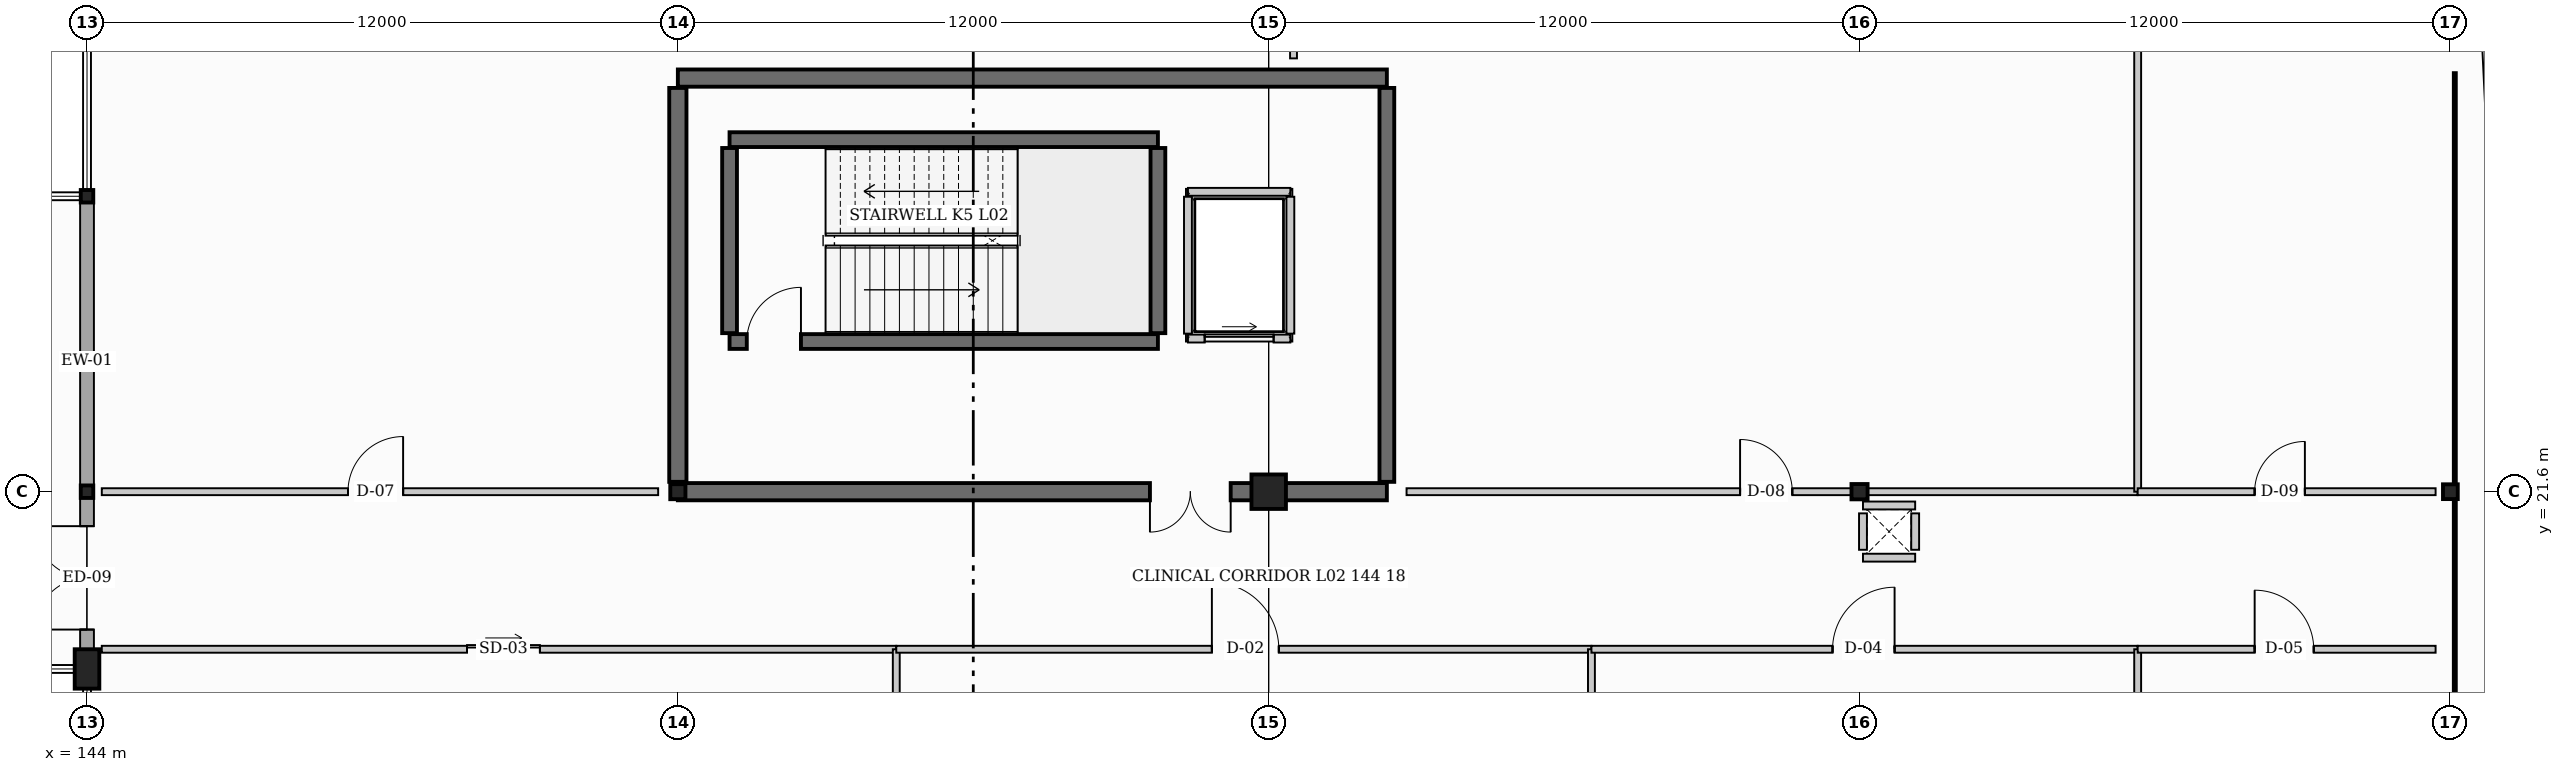
"""IFC4 building model, lengths in metres.
Left out: names, types, materials, properties, quantities, classifications, styles, units other than length and angle.
Written with IfcOpenShell. Run it as: python <this file> out.ifc"""

import sys

from ifc_helpers import new_model, si_unit, direction, frame, frame_2d, origin, origin_2d, place, context, subcontext, project, spatial, rectangle, hollow_rectangle, i_section, extrude, element, fill, save


model = new_model("IFC4")
c1 = context("Model", 3, precision=1e-05, world=origin(), true_north=direction((0.0, 1.0)))
c2 = subcontext(c1, "Body", "Model", "MODEL_VIEW")
j1 = project(units=[si_unit("LENGTHUNIT", "METRE"), si_unit("PLANEANGLEUNIT", "RADIAN")], contexts=[c1])
p1 = place(None, origin())
s1 = spatial("IfcSite", under=j1, at=p1, CompositionType="ELEMENT")
p2 = place(p1, origin())
s2 = spatial("IfcBuilding", under=s1, at=p2, CompositionType="ELEMENT")
p3 = place(p2, frame((0.0, 0.0, 9.6)))
s3 = spatial("IfcBuildingStorey", under=s2, at=p3, CompositionType="ELEMENT", Elevation=9.6)
p4 = place(p3, frame((144.0, 21.6, 0.0), z_axis=(0.0, 0.0, 1.0), x_axis=(1.0, 0.0, 0.0)))
e1 = element("IfcColumn", 1, at=p4, inside=s3, PredefinedType="COLUMN", context=c2, shape_type="SweptSolid", body=[
    extrude(i_section(OverallWidth=0.254, OverallDepth=0.254, WebThickness=0.009, FlangeThickness=0.014, at=origin_2d()), origin(), (0.0, 0.0, 1.0), 4.8),
])
p5 = place(p3, frame((156.0, 21.6, 0.0), z_axis=(0.0, 0.0, 1.0), x_axis=(0.0, 1.0, 0.0)))
e2 = element("IfcColumn", 2, at=p5, inside=s3, PredefinedType="COLUMN", context=c2, shape_type="SweptSolid", body=[
    extrude(i_section(OverallWidth=0.305, OverallDepth=0.308, WebThickness=0.01, FlangeThickness=0.015, at=origin_2d()), origin(), (0.0, 0.0, 1.0), 4.8),
])
p6 = place(p3, frame((168.0, 21.6, 0.0), z_axis=(0.0, 0.0, 1.0), x_axis=(1.0, 0.0, 0.0)))
e3 = element("IfcColumn", 3, at=p6, inside=s3, PredefinedType="COLUMN", context=c2, shape_type="SweptSolid", body=[
    extrude(rectangle(XDim=0.7, YDim=0.7, at=origin_2d()), origin(), (0.0, 0.0, 1.0), 4.8),
])
p7 = place(p3, frame((180.0, 21.6, 0.0), z_axis=(0.0, 0.0, 1.0), x_axis=(0.0, 1.0, 0.0)))
e4 = element("IfcColumn", 4, at=p7, inside=s3, PredefinedType="COLUMN", context=c2, shape_type="SweptSolid", body=[
    extrude(i_section(OverallWidth=0.311, OverallDepth=0.327, WebThickness=0.016, FlangeThickness=0.025, at=origin_2d()), origin(), (0.0, 0.0, 1.0), 4.8),
])
p8 = place(p3, frame((192.0, 21.6, 0.0), z_axis=(0.0, 0.0, 1.0), x_axis=(1.0, 0.0, 0.0)))
e5 = element("IfcColumn", 5, at=p8, inside=s3, PredefinedType="COLUMN", context=c2, shape_type="SweptSolid", body=[
    extrude(hollow_rectangle(XDim=0.3, YDim=0.3, WallThickness=0.012, at=origin_2d()), origin(), (0.0, 0.0, 1.0), 4.8),
])
p9 = place(p3, frame((144.0, 18.0, 0.0), z_axis=(0.0, 0.0, 1.0), x_axis=(1.0, 0.0, 0.0)))
e6 = element("IfcColumn", 6, at=p9, inside=s3, PredefinedType="PILASTER", context=c2, shape_type="SweptSolid", body=[
    extrude(rectangle(XDim=0.5, YDim=0.8, at=origin_2d()), origin(), (0.0, 0.0, 1.0), 4.8),
])
p10 = place(p3, frame((144.0, 27.6, 0.0), z_axis=(0.0, 0.0, 1.0), x_axis=(1.0, 0.0, 0.0)))
e7 = element("IfcColumn", 7, at=p10, inside=s3, PredefinedType="COLUMN", context=c2, shape_type="SweptSolid", body=[
    extrude(i_section(OverallWidth=0.254, OverallDepth=0.254, WebThickness=0.009, FlangeThickness=0.014, at=origin_2d()), origin(), (0.0, 0.0, 1.0), 4.8),
])
p11 = place(p3, frame((156.0, 30.0, 0.0), z_axis=(0.0, 0.0, 1.0), x_axis=(1.0, 0.0, 0.0)))
e8 = element("IfcWall", 8, at=p11, inside=s3, PredefinedType="SHEAR", context=c2, shape_type="SweptSolid", body=[
    extrude(rectangle(XDim=14.4, YDim=0.35, at=frame_2d((7.2, 0.0))), origin(), (0.0, 0.0, 1.0), 4.8),
])
p12 = place(p3, frame((170.4, 21.6, 0.0), z_axis=(0.0, 0.0, 1.0), x_axis=(-1.0, 0.0, 0.0)))
e9 = element("IfcWall", 9, at=p12, inside=s3, PredefinedType="SHEAR", context=c2, shape_type="SweptSolid", body=[
    extrude(rectangle(XDim=14.4, YDim=0.35, at=frame_2d((7.2, 0.0))), origin(), (0.0, 0.0, 1.0), 4.8),
])
p13 = place(p12, frame((3.172, 0.0, 0.0)))
e10 = element("IfcOpeningElement", 10, at=p13, cuts=e9, PredefinedType="OPENING", context=c2, shape_type="SweptSolid", body=[
    extrude(rectangle(XDim=1.64, YDim=2.2, at=frame_2d((0.82, 1.1))), frame((0.0, 0.185, 0.0), z_axis=(0.0, -1.0, 0.0), x_axis=(1.0, 0.0, 0.0)), (0.0, 0.0, 1.0), 0.37),
])
p14 = place(p3, frame((156.0, 21.8, 0.0), z_axis=(0.0, 0.0, 1.0), x_axis=(0.0, 1.0, 0.0)))
e11 = element("IfcWall", 11, at=p14, inside=s3, PredefinedType="SHEAR", context=c2, shape_type="SweptSolid", body=[
    extrude(rectangle(XDim=8.0, YDim=0.35, at=frame_2d((4.0, 0.0))), origin(), (0.0, 0.0, 1.0), 4.8),
])
p15 = place(p3, frame((170.4, 29.8, 0.0), z_axis=(0.0, 0.0, 1.0), x_axis=(0.0, -1.0, 0.0)))
e12 = element("IfcWall", 12, at=p15, inside=s3, PredefinedType="SHEAR", context=c2, shape_type="SweptSolid", body=[
    extrude(rectangle(XDim=8.0, YDim=0.3, at=frame_2d((4.0, 0.0))), origin(), (0.0, 0.0, 1.0), 4.8),
])
p16 = place(p3, frame((157.05, 24.65, 0.0), z_axis=(0.0, 0.0, 1.0), x_axis=(1.0, 0.0, 0.0)))
e13 = element("IfcWall", 13, at=p16, inside=s3, PredefinedType="SHEAR", context=c2, shape_type="SweptSolid", body=[
    extrude(rectangle(XDim=8.7, YDim=0.3, at=frame_2d((4.35, 0.0))), origin(), (0.0, 0.0, 1.0), 4.8),
])
p17 = place(p16, frame((0.35, 0.0, 0.0)))
e14 = element("IfcOpeningElement", 14, at=p17, cuts=e13, PredefinedType="OPENING", context=c2, shape_type="SweptSolid", body=[
    extrude(rectangle(XDim=1.1, YDim=2.15, at=frame_2d((0.55, 1.075))), frame((0.0, 0.16, 0.0), z_axis=(0.0, -1.0, 0.0), x_axis=(1.0, 0.0, 0.0)), (0.0, 0.0, 1.0), 0.32),
])
p18 = place(p3, frame((165.75, 28.75, 0.0), z_axis=(0.0, 0.0, 1.0), x_axis=(-1.0, 0.0, 0.0)))
e15 = element("IfcWall", 15, at=p18, inside=s3, PredefinedType="SHEAR", context=c2, shape_type="SweptSolid", body=[
    extrude(rectangle(XDim=8.7, YDim=0.3, at=frame_2d((4.35, 0.0))), origin(), (0.0, 0.0, 1.0), 4.8),
])
for number, where, z_axis, x_axis in (
    (16, (157.05, 24.82, 0.0), (0.0, 0.0, 1.0), (0.0, 1.0, 0.0)),
    (17, (165.75, 24.82, 0.0), (0.0, 0.0, 1.0), (0.0, 1.0, 0.0)),
):
    element("IfcWall", number, at=place(p3, frame(where, z_axis=z_axis, x_axis=x_axis)), inside=s3, PredefinedType="SHEAR", context=c2, shape_type="SweptSolid", body=[
        extrude(rectangle(XDim=3.76, YDim=0.3, at=frame_2d((1.88, 0.0))), origin(), (0.0, 0.0, 1.0), 4.8),
    ])
for number, where, z_axis, x_axis in (
    (18, (180.07, 20.26, 0.0), (0.0, 0.0, 1.0), (1.0, 0.0, 0.0)),
    (19, (181.13, 21.32, 0.0), (0.0, 0.0, 1.0), (-1.0, 0.0, 0.0)),
):
    element("IfcWall", number, at=place(p3, frame(where, z_axis=z_axis, x_axis=x_axis)), inside=s3, PredefinedType="PARTITIONING", context=c2, shape_type="SweptSolid", body=[
        extrude(rectangle(XDim=1.06, YDim=0.16, at=frame_2d((0.53, 0.0))), origin(), (0.0, 0.0, 1.0), 3.55),
    ])
for number, where, z_axis, x_axis in (
    (20, (180.07, 21.16, 0.0), (0.0, 0.0, 1.0), (0.0, -1.0, 0.0)),
    (21, (181.13, 20.42, 0.0), (0.0, 0.0, 1.0), (0.0, 1.0, 0.0)),
):
    element("IfcWall", number, at=place(p3, frame(where, z_axis=z_axis, x_axis=x_axis)), inside=s3, PredefinedType="PARTITIONING", context=c2, shape_type="SweptSolid", body=[
        extrude(rectangle(XDim=0.74, YDim=0.16, at=frame_2d((0.37, 0.0))), origin(), (0.0, 0.0, 1.0), 3.55),
    ])
p19 = place(p3, frame((144.0, 18.0, 0.0), z_axis=(0.0, 0.0, 1.0), x_axis=(0.0, 1.0, 0.0)))
e22 = element("IfcWall", 22, at=p19, inside=s3, PredefinedType="STANDARD", context=c2, shape_type="SweptSolid", body=[
    extrude(rectangle(XDim=9.6, YDim=0.28, at=frame_2d((4.8, 0.0))), origin(), (0.0, 0.0, 1.0), 3.53),
])
p20 = place(p19, frame((0.8, 0.0, 0.0)))
e23 = element("IfcOpeningElement", 23, at=p20, cuts=e22, PredefinedType="OPENING", context=c2, shape_type="SweptSolid", body=[
    extrude(rectangle(XDim=2.1, YDim=2.25, at=frame_2d((1.05, 1.125))), frame((0.0, 0.15, 0.0), z_axis=(0.0, -1.0, 0.0), x_axis=(1.0, 0.0, 0.0)), (0.0, 0.0, 1.0), 0.3),
])
p21 = place(p3, frame((166.36, 24.71, 0.0), z_axis=(0.0, 0.0, 1.0), x_axis=(1.0, 0.0, 0.0)))
e24 = element("IfcWall", 24, at=p21, inside=s3, PredefinedType="PARTITIONING", context=c2, shape_type="SweptSolid", body=[
    extrude(rectangle(XDim=2.08, YDim=0.16, at=frame_2d((1.04, 0.0))), origin(), (0.0, 0.0, 1.0), 4.43),
])
p22 = place(p21, frame((0.34, 0.0, 0.0)))
e25 = element("IfcOpeningElement", 25, at=p22, cuts=e24, PredefinedType="OPENING", context=c2, shape_type="SweptSolid", body=[
    extrude(rectangle(XDim=1.4, YDim=2.2, at=frame_2d((0.7, 1.1))), frame((0.0, 0.09, 0.0), z_axis=(0.0, -1.0, 0.0), x_axis=(1.0, 0.0, 0.0)), (0.0, 0.0, 1.0), 0.18),
])
p23 = place(p3, frame((168.44, 27.69, 0.0), z_axis=(0.0, 0.0, 1.0), x_axis=(-1.0, 0.0, 0.0)))
e26 = element("IfcWall", 26, at=p23, inside=s3, PredefinedType="PARTITIONING", context=c2, shape_type="SweptSolid", body=[
    extrude(rectangle(XDim=2.08, YDim=0.16, at=frame_2d((1.04, 0.0))), origin(), (0.0, 0.0, 1.0), 4.43),
])
for number, where, z_axis, x_axis in (
    (27, (166.36, 27.59, 0.0), (0.0, 0.0, 1.0), (0.0, -1.0, 0.0)),
    (28, (168.44, 24.81, 0.0), (0.0, 0.0, 1.0), (0.0, 1.0, 0.0)),
):
    element("IfcWall", number, at=place(p3, frame(where, z_axis=z_axis, x_axis=x_axis)), inside=s3, PredefinedType="PARTITIONING", context=c2, shape_type="SweptSolid", body=[
        extrude(rectangle(XDim=2.78, YDim=0.16, at=frame_2d((1.39, 0.0))), origin(), (0.0, 0.0, 1.0), 4.43),
    ])
p24 = place(p3, frame((144.3, 18.4, 0.0), z_axis=(0.0, 0.0, 1.0), x_axis=(1.0, 0.0, 0.0)))
e29 = element("IfcWall", 29, at=p24, inside=s3, PredefinedType="PARTITIONING", context=c2, shape_type="SweptSolid", body=[
    extrude(rectangle(XDim=16.136, YDim=0.14, at=frame_2d((8.068, 0.0))), origin(), (0.0, 0.0, 1.0), 3.818),
])
p25 = place(p24, frame((7.418, 0.0, 0.0)))
e30 = element("IfcOpeningElement", 30, at=p25, cuts=e29, PredefinedType="OPENING", context=c2, shape_type="SweptSolid", body=[
    extrude(rectangle(XDim=1.48, YDim=2.26, at=frame_2d((0.74, 1.13))), frame((0.0, 0.08, 0.0), z_axis=(0.0, -1.0, 0.0), x_axis=(1.0, 0.0, 0.0)), (0.0, 0.0, 1.0), 0.16),
])
p26 = place(p3, frame((160.436, 0.3, 0.0), z_axis=(0.0, 0.0, 1.0), x_axis=(0.0, 1.0, 0.0)))
e31 = element("IfcWall", 31, at=p26, inside=s3, PredefinedType="PARTITIONING", context=c2, shape_type="SweptSolid", body=[
    extrude(rectangle(XDim=18.1, YDim=0.14, at=frame_2d((9.05, 0.0))), origin(), (0.0, 0.0, 1.0), 3.53),
])
p27 = place(p3, frame((160.436, 18.4, 0.0), z_axis=(0.0, 0.0, 1.0), x_axis=(1.0, 0.0, 0.0)))
e32 = element("IfcWall", 32, at=p27, inside=s3, PredefinedType="PARTITIONING", context=c2, shape_type="SweptSolid", body=[
    extrude(rectangle(XDim=14.119, YDim=0.14, at=frame_2d((7.06, 0.0))), origin(), (0.0, 0.0, 1.0), 3.828),
])
p28 = place(p27, frame((6.41, 0.0, 0.0)))
e33 = element("IfcOpeningElement", 33, at=p28, cuts=e32, PredefinedType="OPENING", context=c2, shape_type="SweptSolid", body=[
    extrude(rectangle(XDim=1.36, YDim=2.18, at=frame_2d((0.68, 1.09))), frame((0.0, 0.08, 0.0), z_axis=(0.0, -1.0, 0.0), x_axis=(1.0, 0.0, 0.0)), (0.0, 0.0, 1.0), 0.16),
])
p29 = place(p3, frame((174.555, 0.3, 0.0), z_axis=(0.0, 0.0, 1.0), x_axis=(0.0, 1.0, 0.0)))
e34 = element("IfcWall", 34, at=p29, inside=s3, PredefinedType="PARTITIONING", context=c2, shape_type="SweptSolid", body=[
    extrude(rectangle(XDim=18.1, YDim=0.14, at=frame_2d((9.05, 0.0))), origin(), (0.0, 0.0, 1.0), 3.733),
])
p30 = place(p3, frame((174.555, 18.4, 0.0), z_axis=(0.0, 0.0, 1.0), x_axis=(1.0, 0.0, 0.0)))
e35 = element("IfcWall", 35, at=p30, inside=s3, PredefinedType="PARTITIONING", context=c2, shape_type="SweptSolid", body=[
    extrude(rectangle(XDim=11.094, YDim=0.14, at=frame_2d((5.547, 0.0))), origin(), (0.0, 0.0, 1.0), 3.892),
])
p31 = place(p30, frame((4.897, 0.0, 0.0)))
e36 = element("IfcOpeningElement", 36, at=p31, cuts=e35, PredefinedType="OPENING", context=c2, shape_type="SweptSolid", body=[
    extrude(rectangle(XDim=1.26, YDim=2.14, at=frame_2d((0.63, 1.07))), frame((0.0, 0.08, 0.0), z_axis=(0.0, -1.0, 0.0), x_axis=(1.0, 0.0, 0.0)), (0.0, 0.0, 1.0), 0.16),
])
p32 = place(p3, frame((185.649, 0.3, 0.0), z_axis=(0.0, 0.0, 1.0), x_axis=(0.0, 1.0, 0.0)))
e37 = element("IfcWall", 37, at=p32, inside=s3, PredefinedType="PARTITIONING", context=c2, shape_type="SweptSolid", body=[
    extrude(rectangle(XDim=18.1, YDim=0.14, at=frame_2d((9.05, 0.0))), origin(), (0.0, 0.0, 1.0), 3.813),
])
p33 = place(p3, frame((185.649, 18.4, 0.0), z_axis=(0.0, 0.0, 1.0), x_axis=(1.0, 0.0, 0.0)))
e38 = element("IfcWall", 38, at=p33, inside=s3, PredefinedType="PARTITIONING", context=c2, shape_type="SweptSolid", body=[
    extrude(rectangle(XDim=6.051, YDim=0.14, at=frame_2d((3.025, 0.0))), origin(), (0.0, 0.0, 1.0), 4.022),
])
p34 = place(p33, frame((2.376, 0.0, 0.0)))
e39 = element("IfcOpeningElement", 39, at=p34, cuts=e38, PredefinedType="OPENING", context=c2, shape_type="SweptSolid", body=[
    extrude(rectangle(XDim=1.2, YDim=2.12, at=frame_2d((0.6, 1.06))), frame((0.0, 0.08, 0.0), z_axis=(0.0, -1.0, 0.0), x_axis=(1.0, 0.0, 0.0)), (0.0, 0.0, 1.0), 0.16),
])
p35 = place(p3, frame((144.3, 21.6, 0.0), z_axis=(0.0, 0.0, 1.0), x_axis=(1.0, 0.0, 0.0)))
e40 = element("IfcWall", 40, at=p35, inside=s3, PredefinedType="PARTITIONING", context=c2, shape_type="SweptSolid", body=[
    extrude(rectangle(XDim=11.3, YDim=0.14, at=frame_2d((5.65, 0.0))), origin(), (0.0, 0.0, 1.0), 3.53),
])
p36 = place(p35, frame((5.0, 0.0, 0.0)))
e41 = element("IfcOpeningElement", 41, at=p36, cuts=e40, PredefinedType="OPENING", context=c2, shape_type="SweptSolid", body=[
    extrude(rectangle(XDim=1.12, YDim=2.08, at=frame_2d((0.56, 1.04))), frame((0.0, 0.08, 0.0), z_axis=(0.0, -1.0, 0.0), x_axis=(1.0, 0.0, 0.0)), (0.0, 0.0, 1.0), 0.16),
])
p37 = place(p3, frame((168.504, 30.4, 0.0), z_axis=(0.0, 0.0, 1.0), x_axis=(0.0, 1.0, 0.0)))
e42 = element("IfcWall", 42, at=p37, inside=s3, PredefinedType="PARTITIONING", context=c2, shape_type="SweptSolid", body=[
    extrude(rectangle(XDim=14.9, YDim=0.14, at=frame_2d((7.45, 0.0))), origin(), (0.0, 0.0, 1.0), 3.818),
])
p38 = place(p3, frame((170.8, 21.6, 0.0), z_axis=(0.0, 0.0, 1.0), x_axis=(1.0, 0.0, 0.0)))
e43 = element("IfcWall", 43, at=p38, inside=s3, PredefinedType="PARTITIONING", context=c2, shape_type="SweptSolid", body=[
    extrude(rectangle(XDim=14.849, YDim=0.14, at=frame_2d((7.424, 0.0))), origin(), (0.0, 0.0, 1.0), 3.813),
])
p39 = place(p38, frame((6.774, 0.0, 0.0)))
e44 = element("IfcOpeningElement", 44, at=p39, cuts=e43, PredefinedType="OPENING", context=c2, shape_type="SweptSolid", body=[
    extrude(rectangle(XDim=1.06, YDim=2.1, at=frame_2d((0.53, 1.05))), frame((0.0, 0.08, 0.0), z_axis=(0.0, -1.0, 0.0), x_axis=(1.0, 0.0, 0.0)), (0.0, 0.0, 1.0), 0.16),
])
p40 = place(p3, frame((185.649, 21.6, 0.0), z_axis=(0.0, 0.0, 1.0), x_axis=(0.0, 1.0, 0.0)))
e45 = element("IfcWall", 45, at=p40, inside=s3, PredefinedType="PARTITIONING", context=c2, shape_type="SweptSolid", body=[
    extrude(rectangle(XDim=23.7, YDim=0.14, at=frame_2d((11.85, 0.0))), origin(), (0.0, 0.0, 1.0), 3.818),
])
p41 = place(p3, frame((185.649, 21.6, 0.0), z_axis=(0.0, 0.0, 1.0), x_axis=(1.0, 0.0, 0.0)))
e46 = element("IfcWall", 46, at=p41, inside=s3, PredefinedType="PARTITIONING", context=c2, shape_type="SweptSolid", body=[
    extrude(rectangle(XDim=6.051, YDim=0.14, at=frame_2d((3.025, 0.0))), origin(), (0.0, 0.0, 1.0), 3.818),
])
p42 = place(p41, frame((2.376, 0.0, 0.0)))
e47 = element("IfcOpeningElement", 47, at=p42, cuts=e46, PredefinedType="OPENING", context=c2, shape_type="SweptSolid", body=[
    extrude(rectangle(XDim=1.02, YDim=2.08, at=frame_2d((0.51, 1.04))), frame((0.0, 0.08, 0.0), z_axis=(0.0, -1.0, 0.0), x_axis=(1.0, 0.0, 0.0)), (0.0, 0.0, 1.0), 0.16),
])
p43 = place(p20, origin())
e48 = element("IfcDoor", 48, at=p43, inside=s3, OperationType="DOUBLE_DOOR_SINGLE_SWING", PredefinedType="DOOR", context=c2, shape_type="SweptSolid", body=[
    extrude(rectangle(XDim=2.1, YDim=2.25, at=frame_2d((1.05, 1.125))), frame((0.0, 0.025, 0.0), z_axis=(0.0, -1.0, 0.0), x_axis=(1.0, 0.0, 0.0)), (0.0, 0.0, 1.0), 0.05),
])
fill(e23, e48)
p44 = place(p22, origin())
e49 = element("IfcDoor", 49, at=p44, inside=s3, OperationType="SLIDING_TO_LEFT", PredefinedType="DOOR", context=c2, shape_type="SweptSolid", body=[
    extrude(rectangle(XDim=1.4, YDim=2.2, at=frame_2d((0.7, 1.1))), frame((0.0, 0.025, 0.0), z_axis=(0.0, -1.0, 0.0), x_axis=(1.0, 0.0, 0.0)), (0.0, 0.0, 1.0), 0.05),
])
fill(e25, e49)
p45 = place(p17, origin())
e50 = element("IfcDoor", 50, at=p45, inside=s3, OperationType="SINGLE_SWING_RIGHT", PredefinedType="DOOR", context=c2, shape_type="SweptSolid", body=[
    extrude(rectangle(XDim=1.1, YDim=2.15, at=frame_2d((0.55, 1.075))), frame((0.0, 0.025, 0.0), z_axis=(0.0, -1.0, 0.0), x_axis=(1.0, 0.0, 0.0)), (0.0, 0.0, 1.0), 0.05),
])
fill(e14, e50)
p46 = place(p13, origin())
e51 = element("IfcDoor", 51, at=p46, inside=s3, OperationType="DOUBLE_DOOR_SINGLE_SWING", PredefinedType="DOOR", context=c2, shape_type="SweptSolid", body=[
    extrude(rectangle(XDim=1.64, YDim=2.2, at=frame_2d((0.82, 1.1))), frame((0.0, 0.025, 0.0), z_axis=(0.0, -1.0, 0.0), x_axis=(1.0, 0.0, 0.0)), (0.0, 0.0, 1.0), 0.05),
])
fill(e10, e51)
p47 = place(p25, origin())
e52 = element("IfcDoor", 52, at=p47, inside=s3, OperationType="SLIDING_TO_LEFT", PredefinedType="DOOR", context=c2, shape_type="SweptSolid", body=[
    extrude(rectangle(XDim=1.48, YDim=2.26, at=frame_2d((0.74, 1.13))), frame((0.0, 0.025, 0.0), z_axis=(0.0, -1.0, 0.0), x_axis=(1.0, 0.0, 0.0)), (0.0, 0.0, 1.0), 0.05),
])
fill(e30, e52)
p48 = place(p28, origin())
e53 = element("IfcDoor", 53, at=p48, inside=s3, OperationType="SINGLE_SWING_LEFT", PredefinedType="DOOR", context=c2, shape_type="SweptSolid", body=[
    extrude(rectangle(XDim=1.36, YDim=2.18, at=frame_2d((0.68, 1.09))), frame((0.0, 0.025, 0.0), z_axis=(0.0, -1.0, 0.0), x_axis=(1.0, 0.0, 0.0)), (0.0, 0.0, 1.0), 0.05),
])
fill(e33, e53)
p49 = place(p31, origin())
e54 = element("IfcDoor", 54, at=p49, inside=s3, OperationType="SINGLE_SWING_RIGHT", PredefinedType="DOOR", context=c2, shape_type="SweptSolid", body=[
    extrude(rectangle(XDim=1.26, YDim=2.14, at=frame_2d((0.63, 1.07))), frame((0.0, 0.025, 0.0), z_axis=(0.0, -1.0, 0.0), x_axis=(1.0, 0.0, 0.0)), (0.0, 0.0, 1.0), 0.05),
])
fill(e36, e54)
p50 = place(p34, origin())
e55 = element("IfcDoor", 55, at=p50, inside=s3, OperationType="SINGLE_SWING_LEFT", PredefinedType="DOOR", context=c2, shape_type="SweptSolid", body=[
    extrude(rectangle(XDim=1.2, YDim=2.12, at=frame_2d((0.6, 1.06))), frame((0.0, 0.025, 0.0), z_axis=(0.0, -1.0, 0.0), x_axis=(1.0, 0.0, 0.0)), (0.0, 0.0, 1.0), 0.05),
])
fill(e39, e55)
p51 = place(p36, origin())
e56 = element("IfcDoor", 56, at=p51, inside=s3, OperationType="SINGLE_SWING_RIGHT", PredefinedType="DOOR", context=c2, shape_type="SweptSolid", body=[
    extrude(rectangle(XDim=1.12, YDim=2.08, at=frame_2d((0.56, 1.04))), frame((0.0, 0.025, 0.0), z_axis=(0.0, -1.0, 0.0), x_axis=(1.0, 0.0, 0.0)), (0.0, 0.0, 1.0), 0.05),
])
fill(e41, e56)
p52 = place(p39, origin())
e57 = element("IfcDoor", 57, at=p52, inside=s3, OperationType="SINGLE_SWING_LEFT", PredefinedType="DOOR", context=c2, shape_type="SweptSolid", body=[
    extrude(rectangle(XDim=1.06, YDim=2.1, at=frame_2d((0.53, 1.05))), frame((0.0, 0.025, 0.0), z_axis=(0.0, -1.0, 0.0), x_axis=(1.0, 0.0, 0.0)), (0.0, 0.0, 1.0), 0.05),
])
fill(e44, e57)
p53 = place(p42, origin())
e58 = element("IfcDoor", 58, at=p53, inside=s3, OperationType="SINGLE_SWING_RIGHT", PredefinedType="DOOR", context=c2, shape_type="SweptSolid", body=[
    extrude(rectangle(XDim=1.02, YDim=2.08, at=frame_2d((0.51, 1.04))), frame((0.0, 0.025, 0.0), z_axis=(0.0, -1.0, 0.0), x_axis=(1.0, 0.0, 0.0)), (0.0, 0.0, 1.0), 0.05),
])
fill(e47, e58)
save(model, sys.argv[1])
